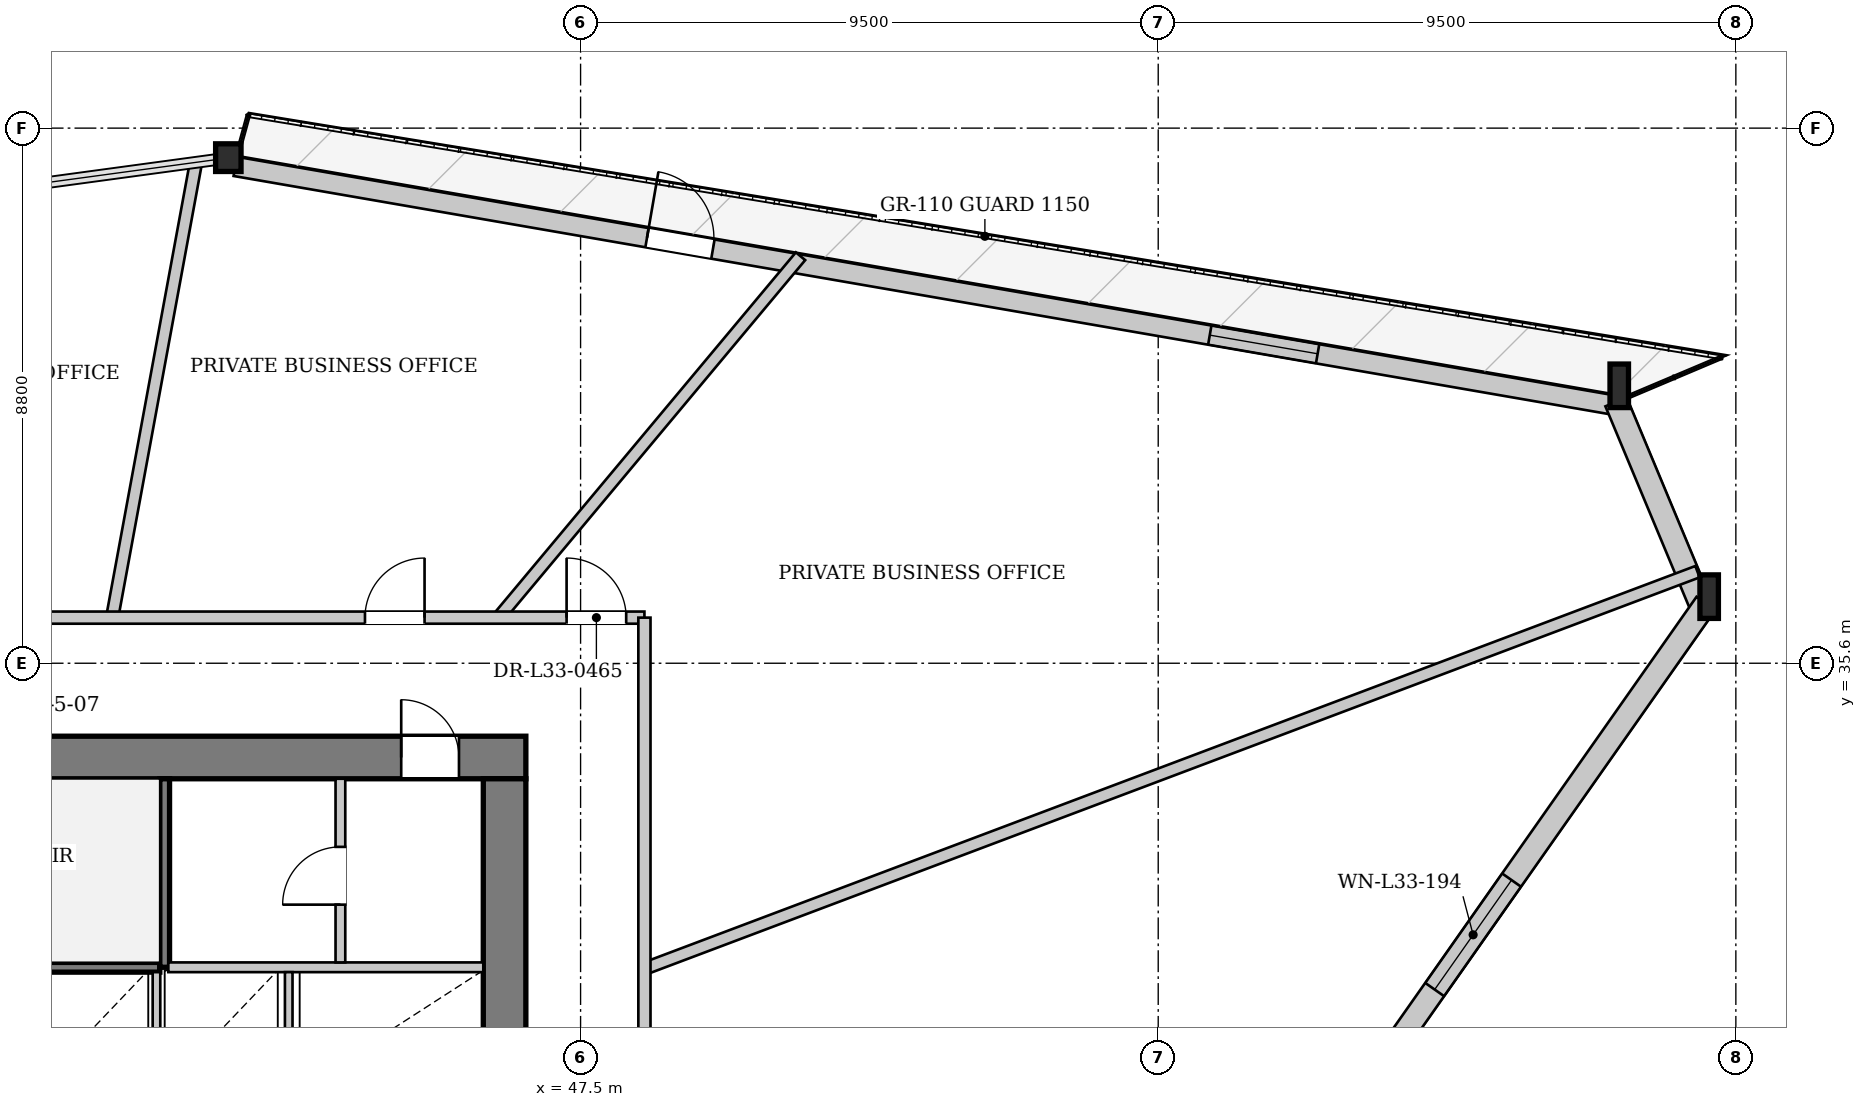
"""IFC4 building model, lengths in metres.
Left out: names, types, materials, properties, quantities, classifications, styles, units other than length and angle.
Written with IfcOpenShell. Run it as: python <this file> out.ifc"""

import sys

from ifc_helpers import new_model, si_unit, direction, frame, frame_2d, origin, origin_2d, place, context, subcontext, project, spatial, rectangle, i_section, extrude, source, transform, mapped, element, fill, save


model = new_model("IFC4")
c1 = context("Model", 3, precision=1e-05, world=origin(), true_north=direction((0.0, 1.0)))
c2 = subcontext(c1, "Body", "Model", "MODEL_VIEW")
j1 = project(units=[si_unit("LENGTHUNIT", "METRE"), si_unit("PLANEANGLEUNIT", "RADIAN")], contexts=[c1])
p1 = place(None, origin())
s1 = spatial("IfcSite", under=j1, at=p1, CompositionType="ELEMENT")
p2 = place(p1, origin())
s2 = spatial("IfcBuilding", under=s1, at=p2, CompositionType="ELEMENT")
p3 = place(p2, frame((0.0, 0.0, 127.0)))
s3 = spatial("IfcBuildingStorey", under=s2, at=p3, CompositionType="ELEMENT", Elevation=127.0)
m1 = source(origin(), c2, "Body", "SweptSolid", [
    extrude(i_section(OverallWidth=0.304, OverallDepth=0.716, WebThickness=0.021, FlangeThickness=0.04, at=origin_2d()), origin(), (0.0, 0.0, 1.0), 3.42),
])
p4 = place(p3, frame((66.164, 36.475, 0.0), z_axis=(-0.060324237266, 0.1289296716, 0.989817218571), x_axis=(-0.905759865851, -0.42379129936, 0.0)))
e1 = element("IfcColumn", 1, at=p4, inside=s3, PredefinedType="COLUMN", context=c2, shape_type="MappedRepresentation", body=[
    mapped(m1, transform((0.0, 0.0, 0.0), x_axis=(1.0, 0.0, 0.0), y_axis=(0.0, 1.0, 0.0), z_axis=(0.0, 0.0, 1.0), scale=1.0)),
])
m2 = source(origin(), c2, "Body", "SweptSolid", [
    extrude(i_section(OverallWidth=0.304, OverallDepth=0.716, WebThickness=0.021, FlangeThickness=0.04, at=origin_2d()), origin(), (0.0, 0.0, 1.0), 3.415),
])
p5 = place(p3, frame((64.705, 39.971, 0.0), z_axis=(-0.071982830574, 0.111941522024, 0.991104216392), x_axis=(-0.841108663923, -0.540866171501, 0.0)))
e2 = element("IfcColumn", 2, at=p5, inside=s3, PredefinedType="COLUMN", context=c2, shape_type="MappedRepresentation", body=[
    mapped(m2, transform((0.0, 0.0, 0.0), x_axis=(1.0, 0.0, 0.0), y_axis=(0.0, 1.0, 0.0), z_axis=(0.0, 0.0, 1.0), scale=1.0)),
])
m3 = source(origin(), c2, "Body", "SweptSolid", [
    extrude(i_section(OverallWidth=0.418, OverallDepth=0.455, WebThickness=0.038, FlangeThickness=0.059, at=origin_2d()), origin(), (0.0, 0.0, 1.0), 3.397),
])
p6 = place(p3, frame((41.848, 43.928, 0.0), z_axis=(-0.082941573755, -0.008193535016, 0.996520727997), x_axis=(0.098308305656, -0.995156006382, 0.0)))
e3 = element("IfcColumn", 3, at=p6, inside=s3, PredefinedType="COLUMN", context=c2, shape_type="MappedRepresentation", body=[
    mapped(m3, transform((0.0, 0.0, 0.0), x_axis=(1.0, 0.0, 0.0), y_axis=(0.0, 1.0, 0.0), z_axis=(0.0, 0.0, 1.0), scale=1.0)),
])
p7 = place(p3, frame((41.82, 43.771, 0.0), z_axis=(0.0, 0.0, 1.0), x_axis=(0.98534400913, -0.170578966088, 0.0)))
e4 = element("IfcWall", 4, at=p7, inside=s3, PredefinedType="SOLIDWALL", context=c2, shape_type="SweptSolid", body=[
    extrude(rectangle(XDim=23.198, YDim=0.32, at=frame_2d((11.599, 0.0))), origin(), (0.0, 0.0, 1.0), 2.692),
])
p8 = place(p7, frame((6.873, 0.0, 0.0)))
e5 = element("IfcOpeningElement", 5, at=p8, cuts=e4, PredefinedType="OPENING", context=c2, shape_type="SweptSolid", body=[
    extrude(rectangle(XDim=1.1, YDim=2.3, at=frame_2d((0.55, 1.15))), frame((0.0, 0.17, 0.0), z_axis=(0.0, -1.0, 0.0), x_axis=(1.0, 0.0, 0.0)), (0.0, 0.0, 1.0), 0.34),
])
p9 = place(p7, frame((16.266, 0.0, 0.372)))
e6 = element("IfcOpeningElement", 6, at=p9, cuts=e4, PredefinedType="OPENING", context=c2, shape_type="SweptSolid", body=[
    extrude(rectangle(XDim=1.8, YDim=2.2, at=frame_2d((0.9, 1.1))), frame((0.0, 0.17, 0.0), z_axis=(0.0, -1.0, 0.0), x_axis=(1.0, 0.0, 0.0)), (0.0, 0.0, 1.0), 0.34),
])
p10 = place(p3, frame((64.53, 39.898, 0.0), z_axis=(0.0, 0.0, 1.0), x_axis=(0.38513691565, -0.92285944553, 0.0)))
e7 = element("IfcWall", 7, at=p10, inside=s3, PredefinedType="SOLIDWALL", context=c2, shape_type="SweptSolid", body=[
    extrude(rectangle(XDim=3.789, YDim=0.38, at=frame_2d((1.895, 0.0))), origin(), (0.0, 0.0, 1.0), 2.692),
])
p11 = place(p3, frame((66.009, 36.584, 0.0), z_axis=(0.0, 0.0, 1.0), x_axis=(-0.574933262146, -0.818200308041, 0.0)))
e8 = element("IfcWall", 8, at=p11, inside=s3, PredefinedType="SOLIDWALL", context=c2, shape_type="SweptSolid", body=[
    extrude(rectangle(XDim=23.79, YDim=0.38, at=frame_2d((11.895, 0.0))), origin(), (0.0, 0.0, 1.0), 2.692),
])
p12 = place(p11, frame((5.561, 0.0, 0.322)))
e9 = element("IfcOpeningElement", 9, at=p12, cuts=e8, PredefinedType="OPENING", context=c2, shape_type="SweptSolid", body=[
    extrude(rectangle(XDim=2.2, YDim=2.25, at=frame_2d((1.1, 1.125))), frame((0.0, 0.2, 0.0), z_axis=(0.0, -1.0, 0.0), x_axis=(1.0, 0.0, 0.0)), (0.0, 0.0, 1.0), 0.4),
])
p13 = place(p11, frame((16.779, 0.0, 0.322)))
e10 = element("IfcOpeningElement", 10, at=p13, cuts=e8, PredefinedType="OPENING", context=c2, shape_type="SweptSolid", body=[
    extrude(rectangle(XDim=2.2, YDim=2.25, at=frame_2d((1.1, 1.125))), frame((0.0, 0.2, 0.0), z_axis=(0.0, -1.0, 0.0), x_axis=(1.0, 0.0, 0.0)), (0.0, 0.0, 1.0), 0.4),
])
p14 = place(p3, frame((29.4, 34.05, 0.0), z_axis=(0.0, 0.0, 1.0), x_axis=(1.0, 0.0, 0.0)))
e11 = element("IfcWall", 11, at=p14, inside=s3, PredefinedType="SHEAR", context=c2, shape_type="SweptSolid", body=[
    extrude(rectangle(XDim=17.2, YDim=0.7, at=frame_2d((8.6, 0.0))), origin(), (0.0, 0.0, 1.0), 3.3),
])
p15 = place(p14, frame((1.7, 0.0, 0.0)))
e12 = element("IfcOpeningElement", 12, at=p15, cuts=e11, PredefinedType="OPENING", context=c2, shape_type="SweptSolid", body=[
    extrude(rectangle(XDim=0.95, YDim=2.1, at=frame_2d((0.475, 1.05))), frame((0.0, 0.36, 0.0), z_axis=(0.0, -1.0, 0.0), x_axis=(1.0, 0.0, 0.0)), (0.0, 0.0, 1.0), 0.72),
])
p16 = place(p14, frame((4.08, 0.0, 0.0)))
e13 = element("IfcOpeningElement", 13, at=p16, cuts=e11, PredefinedType="OPENING", context=c2, shape_type="SweptSolid", body=[
    extrude(rectangle(XDim=1.32, YDim=2.2, at=frame_2d((0.66, 1.1))), frame((0.0, 0.36, 0.0), z_axis=(0.0, -1.0, 0.0), x_axis=(1.0, 0.0, 0.0)), (0.0, 0.0, 1.0), 0.72),
])
p17 = place(p14, frame((15.15, 0.0, 0.0)))
e14 = element("IfcOpeningElement", 14, at=p17, cuts=e11, PredefinedType="OPENING", context=c2, shape_type="SweptSolid", body=[
    extrude(rectangle(XDim=0.95, YDim=2.1, at=frame_2d((0.475, 1.05))), frame((0.0, 0.36, 0.0), z_axis=(0.0, -1.0, 0.0), x_axis=(1.0, 0.0, 0.0)), (0.0, 0.0, 1.0), 0.72),
])
p18 = place(p3, frame((46.25, 33.7, 0.0), z_axis=(0.0, 0.0, 1.0), x_axis=(0.0, -1.0, 0.0)))
e15 = element("IfcWall", 15, at=p18, inside=s3, PredefinedType="SHEAR", context=c2, shape_type="SweptSolid", body=[
    extrude(rectangle(XDim=14.2, YDim=0.7, at=frame_2d((7.1, 0.0))), origin(), (0.0, 0.0, 1.0), 3.3),
])
p19 = place(p18, frame((5.18, 0.0, 0.0)))
e16 = element("IfcOpeningElement", 16, at=p19, cuts=e15, PredefinedType="OPENING", context=c2, shape_type="SweptSolid", body=[
    extrude(rectangle(XDim=1.6, YDim=2.2, at=frame_2d((0.8, 1.1))), frame((0.0, 0.36, 0.0), z_axis=(0.0, -1.0, 0.0), x_axis=(1.0, 0.0, 0.0)), (0.0, 0.0, 1.0), 0.72),
])
p20 = place(p3, frame((33.28, 30.6, 0.0), z_axis=(0.0, 0.0, 1.0), x_axis=(1.0, 0.0, 0.0)))
e17 = element("IfcWall", 17, at=p20, inside=s3, PredefinedType="PARTITIONING", context=c2, shape_type="SweptSolid", body=[
    extrude(rectangle(XDim=7.3, YDim=0.16, at=frame_2d((3.65, 0.0))), origin(), (0.0, 0.0, 1.0), 3.3),
])
p21 = place(p3, frame((40.66, 30.6, 0.0), z_axis=(0.0, 0.0, 1.0), x_axis=(0.0, 1.0, 0.0)))
e18 = element("IfcWall", 18, at=p21, inside=s3, PredefinedType="PARTITIONING", context=c2, shape_type="SweptSolid", body=[
    extrude(rectangle(XDim=3.1, YDim=0.16, at=frame_2d((1.55, 0.0))), origin(), (0.0, 0.0, 1.0), 3.3),
])
p22 = place(p3, frame((40.72, 30.6, 0.0), z_axis=(0.0, 0.0, 1.0), x_axis=(1.0, 0.0, 0.0)))
e19 = element("IfcWall", 19, at=p22, inside=s3, PredefinedType="PARTITIONING", context=c2, shape_type="SweptSolid", body=[
    extrude(rectangle(XDim=5.18, YDim=0.16, at=frame_2d((2.59, 0.0))), origin(), (0.0, 0.0, 1.0), 3.3),
])
for number, where, z_axis, x_axis in (
    (20, (40.525, 28.6, 0.0), (0.0, 0.0, 1.0), (0.0, 1.0, 0.0)),
    (21, (42.7, 28.6, 0.0), (0.0, 0.0, 1.0), (0.0, 1.0, 0.0)),
):
    element("IfcWall", number, at=place(p3, frame(where, z_axis=z_axis, x_axis=x_axis)), inside=s3, PredefinedType="PARTITIONING", context=c2, shape_type="SweptSolid", body=[
        extrude(rectangle(XDim=1.92, YDim=0.125, at=frame_2d((0.96, 0.0))), origin(), (0.0, 0.0, 1.0), 3.3),
    ])
p23 = place(p3, frame((43.55, 30.68, 0.0), z_axis=(0.0, 0.0, 1.0), x_axis=(0.0, 1.0, 0.0)))
e22 = element("IfcWall", 22, at=p23, inside=s3, PredefinedType="PARTITIONING", context=c2, shape_type="SweptSolid", body=[
    extrude(rectangle(XDim=3.02, YDim=0.16, at=frame_2d((1.51, 0.0))), origin(), (0.0, 0.0, 1.0), 3.3),
])
p24 = place(p23, frame((0.95, 0.0, 0.0)))
e23 = element("IfcOpeningElement", 23, at=p24, cuts=e22, PredefinedType="OPENING", context=c2, shape_type="SweptSolid", body=[
    extrude(rectangle(XDim=0.95, YDim=2.1, at=frame_2d((0.475, 1.05))), frame((0.0, 0.09, 0.0), z_axis=(0.0, -1.0, 0.0), x_axis=(1.0, 0.0, 0.0)), (0.0, 0.0, 1.0), 0.18),
])
p25 = place(p3, frame((48.55, 30.577, 0.0), z_axis=(0.0, 0.0, 1.0), x_axis=(0.935722269148, 0.352737629154, 0.0)))
e24 = element("IfcWall", 24, at=p25, inside=s3, PredefinedType="PARTITIONING", context=c2, shape_type="SweptSolid", body=[
    extrude(rectangle(XDim=18.508, YDim=0.2, at=frame_2d((9.254, 0.0))), origin(), (0.0, 0.0, 1.0), 2.795),
])
p26 = place(p3, frame((46.15, 36.35, 0.0), z_axis=(0.0, 0.0, 1.0), x_axis=(0.641321489546, 0.767272276996, 0.0)))
e25 = element("IfcWall", 25, at=p26, inside=s3, PredefinedType="PARTITIONING", context=c2, shape_type="SweptSolid", body=[
    extrude(rectangle(XDim=7.746, YDim=0.2, at=frame_2d((3.873, 0.0))), origin(), (0.0, 0.0, 1.0), 3.3),
])
p27 = place(p3, frame((39.796, 36.35, 0.0), z_axis=(0.0, 0.0, 1.0), x_axis=(0.181143577678, 0.983456661102, 0.0)))
e26 = element("IfcWall", 26, at=p27, inside=s3, PredefinedType="PARTITIONING", context=c2, shape_type="SweptSolid", body=[
    extrude(rectangle(XDim=7.581, YDim=0.2, at=frame_2d((3.791, 0.0))), origin(), (0.0, 0.0, 1.0), 2.785),
])
p28 = place(p3, frame((27.45, 36.35, 0.0), z_axis=(0.0, 0.0, 1.0), x_axis=(1.0, 0.0, 0.0)))
e27 = element("IfcWall", 27, at=p28, inside=s3, PredefinedType="PARTITIONING", context=c2, shape_type="SweptSolid", body=[
    extrude(rectangle(XDim=21.1, YDim=0.2, at=frame_2d((10.55, 0.0))), origin(), (0.0, 0.0, 1.0), 3.3),
])
p29 = place(p28, frame((19.82, 0.0, 0.0)))
e28 = element("IfcOpeningElement", 28, at=p29, cuts=e27, PredefinedType="OPENING", context=c2, shape_type="SweptSolid", body=[
    extrude(rectangle(XDim=0.98, YDim=2.15, at=frame_2d((0.49, 1.075))), frame((0.0, 0.11, 0.0), z_axis=(0.0, -1.0, 0.0), x_axis=(1.0, 0.0, 0.0)), (0.0, 0.0, 1.0), 0.22),
])
p30 = place(p28, frame((16.504, 0.0, 0.0)))
e29 = element("IfcOpeningElement", 29, at=p30, cuts=e27, PredefinedType="OPENING", context=c2, shape_type="SweptSolid", body=[
    extrude(rectangle(XDim=0.98, YDim=2.15, at=frame_2d((0.49, 1.075))), frame((0.0, 0.11, 0.0), z_axis=(0.0, -1.0, 0.0), x_axis=(1.0, 0.0, 0.0)), (0.0, 0.0, 1.0), 0.22),
])
p31 = place(p28, frame((9.034, 0.0, 0.0)))
e30 = element("IfcOpeningElement", 30, at=p31, cuts=e27, PredefinedType="OPENING", context=c2, shape_type="SweptSolid", body=[
    extrude(rectangle(XDim=0.98, YDim=2.15, at=frame_2d((0.49, 1.075))), frame((0.0, 0.11, 0.0), z_axis=(0.0, -1.0, 0.0), x_axis=(1.0, 0.0, 0.0)), (0.0, 0.0, 1.0), 0.22),
])
p32 = place(p28, frame((1.17, 0.0, 0.0)))
e31 = element("IfcOpeningElement", 31, at=p32, cuts=e27, PredefinedType="OPENING", context=c2, shape_type="SweptSolid", body=[
    extrude(rectangle(XDim=0.98, YDim=2.15, at=frame_2d((0.49, 1.075))), frame((0.0, 0.11, 0.0), z_axis=(0.0, -1.0, 0.0), x_axis=(1.0, 0.0, 0.0)), (0.0, 0.0, 1.0), 0.22),
])
p33 = place(p3, frame((48.55, 16.85, 0.0), z_axis=(0.0, 0.0, 1.0), x_axis=(0.0, 1.0, 0.0)))
e32 = element("IfcWall", 32, at=p33, inside=s3, PredefinedType="PARTITIONING", context=c2, shape_type="SweptSolid", body=[
    extrude(rectangle(XDim=19.5, YDim=0.2, at=frame_2d((9.75, 0.0))), origin(), (0.0, 0.0, 1.0), 3.3),
])
p34 = place(p33, frame((10.443, 0.0, 0.0)))
e33 = element("IfcOpeningElement", 33, at=p34, cuts=e32, PredefinedType="OPENING", context=c2, shape_type="SweptSolid", body=[
    extrude(rectangle(XDim=0.98, YDim=2.15, at=frame_2d((0.49, 1.075))), frame((0.0, 0.11, 0.0), z_axis=(0.0, -1.0, 0.0), x_axis=(1.0, 0.0, 0.0)), (0.0, 0.0, 1.0), 0.22),
])
p35 = place(p33, frame((1.975, 0.0, 0.0)))
e34 = element("IfcOpeningElement", 34, at=p35, cuts=e32, PredefinedType="OPENING", context=c2, shape_type="SweptSolid", body=[
    extrude(rectangle(XDim=0.98, YDim=2.15, at=frame_2d((0.49, 1.075))), frame((0.0, 0.11, 0.0), z_axis=(0.0, -1.0, 0.0), x_axis=(1.0, 0.0, 0.0)), (0.0, 0.0, 1.0), 0.22),
])
m4 = source(origin(), c2, "Body", "SweptSolid", [
    extrude(rectangle(XDim=1.1, YDim=2.3, at=frame_2d((0.55, 1.15))), frame((0.0, 0.025, 0.0), z_axis=(0.0, -1.0, 0.0), x_axis=(1.0, 0.0, 0.0)), (0.0, 0.0, 1.0), 0.05),
])
p36 = place(p8, origin())
e35 = element("IfcDoor", 35, at=p36, inside=s3, OperationType="SINGLE_SWING_LEFT", PredefinedType="DOOR", context=c2, shape_type="MappedRepresentation", body=[
    mapped(m4, transform((0.0, 0.0, 0.0), x_axis=(1.0, 0.0, 0.0), y_axis=(0.0, 1.0, 0.0), z_axis=(0.0, 0.0, 1.0), scale=1.0)),
])
fill(e5, e35)
m5 = source(origin(), c2, "Body", "SweptSolid", [
    extrude(rectangle(XDim=1.8, YDim=2.2, at=frame_2d((0.9, 1.1))), frame((0.0, 0.03, 0.0), z_axis=(0.0, -1.0, 0.0), x_axis=(1.0, 0.0, 0.0)), (0.0, 0.0, 1.0), 0.06),
])
p37 = place(p9, origin())
e36 = element("IfcWindow", 36, at=p37, inside=s3, PartitioningType="SINGLE_PANEL", PredefinedType="WINDOW", context=c2, shape_type="MappedRepresentation", body=[
    mapped(m5, transform((0.0, 0.0, 0.0), x_axis=(1.0, 0.0, 0.0), y_axis=(0.0, 1.0, 0.0), z_axis=(0.0, 0.0, 1.0), scale=1.0)),
])
fill(e6, e36)
m6 = source(origin(), c2, "Body", "SweptSolid", [
    extrude(rectangle(XDim=2.2, YDim=2.25, at=frame_2d((1.1, 1.125))), frame((0.0, 0.03, 0.0), z_axis=(0.0, -1.0, 0.0), x_axis=(1.0, 0.0, 0.0)), (0.0, 0.0, 1.0), 0.06),
])
p38 = place(p12, origin())
e37 = element("IfcWindow", 37, at=p38, inside=s3, PartitioningType="SINGLE_PANEL", PredefinedType="WINDOW", context=c2, shape_type="MappedRepresentation", body=[
    mapped(m6, transform((0.0, 0.0, 0.0), x_axis=(1.0, 0.0, 0.0), y_axis=(0.0, 1.0, 0.0), z_axis=(0.0, 0.0, 1.0), scale=1.0)),
])
fill(e9, e37)
m7 = source(origin(), c2, "Body", "SweptSolid", [
    extrude(rectangle(XDim=0.95, YDim=2.1, at=frame_2d((0.475, 1.05))), frame((0.0, 0.025, 0.0), z_axis=(0.0, -1.0, 0.0), x_axis=(1.0, 0.0, 0.0)), (0.0, 0.0, 1.0), 0.05),
])
p39 = place(p24, origin())
e38 = element("IfcDoor", 38, at=p39, inside=s3, OperationType="SINGLE_SWING_LEFT", PredefinedType="DOOR", context=c2, shape_type="MappedRepresentation", body=[
    mapped(m7, transform((0.0, 0.0, 0.0), x_axis=(1.0, 0.0, 0.0), y_axis=(0.0, 1.0, 0.0), z_axis=(0.0, 0.0, 1.0), scale=1.0)),
])
fill(e23, e38)
p40 = place(p17, origin())
e39 = element("IfcDoor", 39, at=p40, inside=s3, OperationType="SINGLE_SWING_LEFT", PredefinedType="DOOR", context=c2, shape_type="MappedRepresentation", body=[
    mapped(m7, transform((0.0, 0.0, 0.0), x_axis=(1.0, 0.0, 0.0), y_axis=(0.0, 1.0, 0.0), z_axis=(0.0, 0.0, 1.0), scale=1.0)),
])
fill(e14, e39)
m8 = source(origin(), c2, "Body", "SweptSolid", [
    extrude(rectangle(XDim=0.98, YDim=2.15, at=frame_2d((0.49, 1.075))), frame((0.0, 0.025, 0.0), z_axis=(0.0, -1.0, 0.0), x_axis=(1.0, 0.0, 0.0)), (0.0, 0.0, 1.0), 0.05),
])
p41 = place(p29, origin())
e40 = element("IfcDoor", 40, at=p41, inside=s3, OperationType="SINGLE_SWING_LEFT", PredefinedType="DOOR", context=c2, shape_type="MappedRepresentation", body=[
    mapped(m8, transform((0.0, 0.0, 0.0), x_axis=(1.0, 0.0, 0.0), y_axis=(0.0, 1.0, 0.0), z_axis=(0.0, 0.0, 1.0), scale=1.0)),
])
fill(e28, e40)
p42 = place(p30, origin())
e41 = element("IfcDoor", 41, at=p42, inside=s3, OperationType="SINGLE_SWING_RIGHT", PredefinedType="DOOR", context=c2, shape_type="MappedRepresentation", body=[
    mapped(m8, transform((0.0, 0.0, 0.0), x_axis=(1.0, 0.0, 0.0), y_axis=(0.0, 1.0, 0.0), z_axis=(0.0, 0.0, 1.0), scale=1.0)),
])
fill(e29, e41)
save(model, sys.argv[1])
